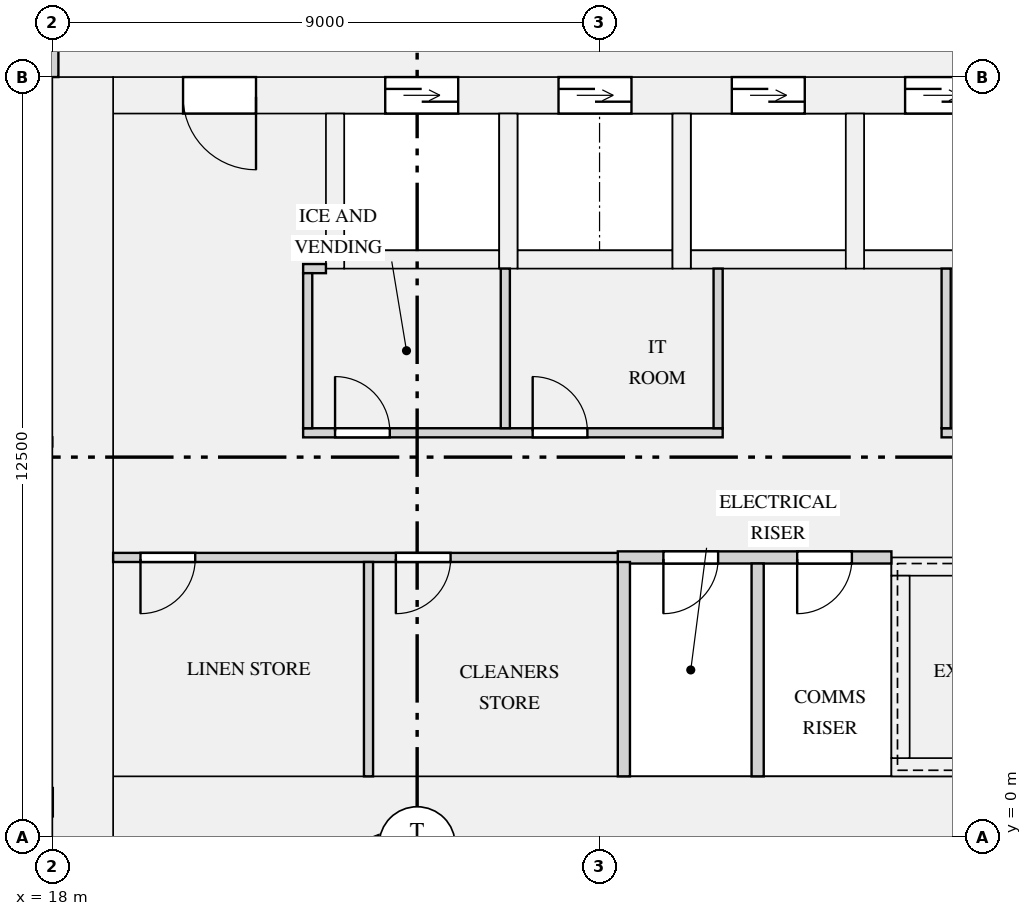
"""IFC4 building model, lengths in metres.
Left out: names, types, materials, properties, quantities, classifications, styles, units other than length and angle.
Written with IfcOpenShell. Run it as: python <this file> out.ifc"""

import sys

from ifc_helpers import new_model, si_unit, direction, frame, frame_2d, origin, place, context, subcontext, project, spatial, rectangle, extrude, element, fill, save


model = new_model("IFC4")
c1 = context("Model", 3, precision=1e-05, world=origin(), true_north=direction((0.0, 1.0)))
c2 = subcontext(c1, "Body", "Model", "MODEL_VIEW")
j1 = project(units=[si_unit("LENGTHUNIT", "METRE"), si_unit("PLANEANGLEUNIT", "RADIAN")], contexts=[c1])
p1 = place(None, origin())
s1 = spatial("IfcSite", under=j1, at=p1, CompositionType="ELEMENT")
p2 = place(p1, origin())
s2 = spatial("IfcBuilding", under=s1, at=p2, CompositionType="ELEMENT")
p3 = place(p2, frame((0.0, 0.0, 19.5)))
s3 = spatial("IfcBuildingStorey", under=s2, at=p3, CompositionType="ELEMENT", Elevation=19.5)
p4 = place(p3, frame((18.5, 0.0, 0.0), z_axis=(0.0, 0.0, 1.0), x_axis=(0.0, 1.0, 0.0)))
e1 = element("IfcWall", 1, at=p4, inside=s3, PredefinedType="SHEAR", context=c2, shape_type="SweptSolid", body=[
    extrude(rectangle(XDim=12.5, YDim=1.0, at=frame_2d((6.25, 0.0))), origin(), (0.0, 0.0, 1.0), 3.15),
])
p5 = place(p3, frame((19.0, 0.5, 0.0), z_axis=(0.0, 0.0, 1.0), x_axis=(1.0, 0.0, 0.0)))
e2 = element("IfcWall", 2, at=p5, inside=s3, PredefinedType="SHEAR", context=c2, shape_type="SweptSolid", body=[
    extrude(rectangle(XDim=34.0, YDim=1.0, at=frame_2d((17.0, 0.0))), origin(), (0.0, 0.0, 1.0), 3.15),
])
p6 = place(p3, frame((19.0, 12.2, 0.0), z_axis=(0.0, 0.0, 1.0), x_axis=(1.0, 0.0, 0.0)))
e3 = element("IfcWall", 3, at=p6, inside=s3, PredefinedType="SHEAR", context=c2, shape_type="SweptSolid", body=[
    extrude(rectangle(XDim=34.0, YDim=0.6, at=frame_2d((17.0, 0.0))), origin(), (0.0, 0.0, 1.0), 3.15),
])
p7 = place(p6, frame((4.475, 0.0, 0.0)))
e4 = element("IfcOpeningElement", 4, at=p7, cuts=e3, PredefinedType="OPENING", context=c2, shape_type="SweptSolid", body=[
    extrude(rectangle(XDim=1.2, YDim=2.1, at=frame_2d((0.6, 1.05))), frame((0.0, 0.31, 0.0), z_axis=(0.0, -1.0, 0.0), x_axis=(1.0, 0.0, 0.0)), (0.0, 0.0, 1.0), 0.62),
])
p8 = place(p6, frame((7.325, 0.0, 0.0)))
e5 = element("IfcOpeningElement", 5, at=p8, cuts=e3, PredefinedType="OPENING", context=c2, shape_type="SweptSolid", body=[
    extrude(rectangle(XDim=1.2, YDim=2.1, at=frame_2d((0.6, 1.05))), frame((0.0, 0.31, 0.0), z_axis=(0.0, -1.0, 0.0), x_axis=(1.0, 0.0, 0.0)), (0.0, 0.0, 1.0), 0.62),
])
p9 = place(p6, frame((10.175, 0.0, 0.0)))
e6 = element("IfcOpeningElement", 6, at=p9, cuts=e3, PredefinedType="OPENING", context=c2, shape_type="SweptSolid", body=[
    extrude(rectangle(XDim=1.2, YDim=2.1, at=frame_2d((0.6, 1.05))), frame((0.0, 0.31, 0.0), z_axis=(0.0, -1.0, 0.0), x_axis=(1.0, 0.0, 0.0)), (0.0, 0.0, 1.0), 0.62),
])
p10 = place(p6, frame((13.025, 0.0, 0.0)))
e7 = element("IfcOpeningElement", 7, at=p10, cuts=e3, PredefinedType="OPENING", context=c2, shape_type="SweptSolid", body=[
    extrude(rectangle(XDim=1.2, YDim=2.1, at=frame_2d((0.6, 1.05))), frame((0.0, 0.31, 0.0), z_axis=(0.0, -1.0, 0.0), x_axis=(1.0, 0.0, 0.0)), (0.0, 0.0, 1.0), 0.62),
])
p11 = place(p6, frame((15.875, 0.0, 0.0)))
e8 = element("IfcOpeningElement", 8, at=p11, cuts=e3, PredefinedType="OPENING", context=c2, shape_type="SweptSolid", body=[
    extrude(rectangle(XDim=1.2, YDim=2.1, at=frame_2d((0.6, 1.05))), frame((0.0, 0.31, 0.0), z_axis=(0.0, -1.0, 0.0), x_axis=(1.0, 0.0, 0.0)), (0.0, 0.0, 1.0), 0.62),
])
p12 = place(p6, frame((24.175, 0.0, 0.0)))
e9 = element("IfcOpeningElement", 9, at=p12, cuts=e3, PredefinedType="OPENING", context=c2, shape_type="SweptSolid", body=[
    extrude(rectangle(XDim=1.1, YDim=2.1, at=frame_2d((0.55, 1.05))), frame((0.0, 0.31, 0.0), z_axis=(0.0, -1.0, 0.0), x_axis=(1.0, 0.0, 0.0)), (0.0, 0.0, 1.0), 0.62),
])
p13 = place(p6, frame((26.425, 0.0, 0.0)))
e10 = element("IfcOpeningElement", 10, at=p13, cuts=e3, PredefinedType="OPENING", context=c2, shape_type="SweptSolid", body=[
    extrude(rectangle(XDim=1.1, YDim=2.1, at=frame_2d((0.55, 1.05))), frame((0.0, 0.31, 0.0), z_axis=(0.0, -1.0, 0.0), x_axis=(1.0, 0.0, 0.0)), (0.0, 0.0, 1.0), 0.62),
])
p14 = place(p6, frame((28.675, 0.0, 0.0)))
e11 = element("IfcOpeningElement", 11, at=p14, cuts=e3, PredefinedType="OPENING", context=c2, shape_type="SweptSolid", body=[
    extrude(rectangle(XDim=1.1, YDim=2.1, at=frame_2d((0.55, 1.05))), frame((0.0, 0.31, 0.0), z_axis=(0.0, -1.0, 0.0), x_axis=(1.0, 0.0, 0.0)), (0.0, 0.0, 1.0), 0.62),
])
p15 = place(p6, frame((1.15, 0.0, 0.0)))
e12 = element("IfcOpeningElement", 12, at=p15, cuts=e3, PredefinedType="OPENING", context=c2, shape_type="SweptSolid", body=[
    extrude(rectangle(XDim=1.2, YDim=2.1, at=frame_2d((0.6, 1.05))), frame((0.0, 0.31, 0.0), z_axis=(0.0, -1.0, 0.0), x_axis=(1.0, 0.0, 0.0)), (0.0, 0.0, 1.0), 0.62),
])
p16 = place(p6, frame((31.65, 0.0, 0.0)))
e13 = element("IfcOpeningElement", 13, at=p16, cuts=e3, PredefinedType="OPENING", context=c2, shape_type="SweptSolid", body=[
    extrude(rectangle(XDim=1.2, YDim=2.1, at=frame_2d((0.6, 1.05))), frame((0.0, 0.31, 0.0), z_axis=(0.0, -1.0, 0.0), x_axis=(1.0, 0.0, 0.0)), (0.0, 0.0, 1.0), 0.62),
])
p17 = place(p3, frame((22.8, 9.5, 0.0), z_axis=(0.0, 0.0, 1.0), x_axis=(1.0, 0.0, 0.0)))
e14 = element("IfcWall", 14, at=p17, inside=s3, PredefinedType="SHEAR", context=c2, shape_type="SweptSolid", body=[
    extrude(rectangle(XDim=2.55, YDim=0.3, at=frame_2d((1.275, 0.0))), origin(), (0.0, 0.0, 1.0), 3.15),
])
p18 = place(p3, frame((22.65, 9.35, 0.0), z_axis=(0.0, 0.0, 1.0), x_axis=(0.0, 1.0, 0.0)))
e15 = element("IfcWall", 15, at=p18, inside=s3, PredefinedType="SHEAR", context=c2, shape_type="SweptSolid", body=[
    extrude(rectangle(XDim=2.55, YDim=0.3, at=frame_2d((1.275, 0.0))), origin(), (0.0, 0.0, 1.0), 3.15),
])
p19 = place(p3, frame((25.65, 9.5, 0.0), z_axis=(0.0, 0.0, 1.0), x_axis=(1.0, 0.0, 0.0)))
e16 = element("IfcWall", 16, at=p19, inside=s3, PredefinedType="SHEAR", context=c2, shape_type="SweptSolid", body=[
    extrude(rectangle(XDim=2.55, YDim=0.3, at=frame_2d((1.275, 0.0))), origin(), (0.0, 0.0, 1.0), 3.15),
])
p20 = place(p3, frame((25.5, 9.35, 0.0), z_axis=(0.0, 0.0, 1.0), x_axis=(0.0, 1.0, 0.0)))
e17 = element("IfcWall", 17, at=p20, inside=s3, PredefinedType="SHEAR", context=c2, shape_type="SweptSolid", body=[
    extrude(rectangle(XDim=2.55, YDim=0.3, at=frame_2d((1.275, 0.0))), origin(), (0.0, 0.0, 1.0), 3.15),
])
p21 = place(p3, frame((28.5, 9.5, 0.0), z_axis=(0.0, 0.0, 1.0), x_axis=(1.0, 0.0, 0.0)))
e18 = element("IfcWall", 18, at=p21, inside=s3, PredefinedType="SHEAR", context=c2, shape_type="SweptSolid", body=[
    extrude(rectangle(XDim=2.55, YDim=0.3, at=frame_2d((1.275, 0.0))), origin(), (0.0, 0.0, 1.0), 3.15),
])
for number, where, z_axis, x_axis in (
    (19, (28.35, 9.35, 0.0), (0.0, 0.0, 1.0), (0.0, 1.0, 0.0)),
    (20, (31.35, 9.5, 0.0), (0.0, 0.0, 1.0), (1.0, 0.0, 0.0)),
    (21, (31.2, 9.35, 0.0), (0.0, 0.0, 1.0), (0.0, 1.0, 0.0)),
):
    element("IfcWall", number, at=place(p3, frame(where, z_axis=z_axis, x_axis=x_axis)), inside=s3, PredefinedType="SHEAR", context=c2, shape_type="SweptSolid", body=[
        extrude(rectangle(XDim=2.55, YDim=0.3, at=frame_2d((1.275, 0.0))), origin(), (0.0, 0.0, 1.0), 3.15),
    ])
p22 = place(p3, frame((31.8, 1.15, 0.0), z_axis=(0.0, 0.0, 1.0), x_axis=(1.0, 0.0, 0.0)))
e22 = element("IfcWall", 22, at=p22, inside=s3, PredefinedType="SHEAR", context=c2, shape_type="SweptSolid", body=[
    extrude(rectangle(XDim=8.4, YDim=0.3, at=frame_2d((4.2, 0.0))), origin(), (0.0, 0.0, 1.0), 3.15),
])
p23 = place(p3, frame((31.8, 4.45, 0.0), z_axis=(0.0, 0.0, 1.0), x_axis=(1.0, 0.0, 0.0)))
e23 = element("IfcWall", 23, at=p23, inside=s3, PredefinedType="SHEAR", context=c2, shape_type="SweptSolid", body=[
    extrude(rectangle(XDim=8.4, YDim=0.3, at=frame_2d((4.2, 0.0))), origin(), (0.0, 0.0, 1.0), 3.15),
])
p24 = place(p23, frame((6.8, 0.0, 0.0)))
e24 = element("IfcOpeningElement", 24, at=p24, cuts=e23, PredefinedType="OPENING", context=c2, shape_type="SweptSolid", body=[
    extrude(rectangle(XDim=1.1, YDim=2.1, at=frame_2d((0.55, 1.05))), frame((0.0, 0.16, 0.0), z_axis=(0.0, -1.0, 0.0), x_axis=(1.0, 0.0, 0.0)), (0.0, 0.0, 1.0), 0.32),
])
p25 = place(p3, frame((31.95, 1.3, 0.0), z_axis=(0.0, 0.0, 1.0), x_axis=(0.0, 1.0, 0.0)))
e25 = element("IfcWall", 25, at=p25, inside=s3, PredefinedType="SHEAR", context=c2, shape_type="SweptSolid", body=[
    extrude(rectangle(XDim=3.0, YDim=0.3, at=frame_2d((1.5, 0.0))), origin(), (0.0, 0.0, 1.0), 3.15),
])
p26 = place(p3, frame((27.3, 4.6, 0.0), z_axis=(0.0, 0.0, 1.0), x_axis=(1.0, 0.0, 0.0)))
e26 = element("IfcWall", 26, at=p26, inside=s3, PredefinedType="PARTITIONING", context=c2, shape_type="SweptSolid", body=[
    extrude(rectangle(XDim=4.5, YDim=0.2, at=frame_2d((2.25, 0.0))), origin(), (0.0, 0.0, 1.0), 2.83),
])
p27 = place(p26, frame((0.75, 0.0, 0.0)))
e27 = element("IfcOpeningElement", 27, at=p27, cuts=e26, PredefinedType="OPENING", context=c2, shape_type="SweptSolid", body=[
    extrude(rectangle(XDim=0.9, YDim=2.1, at=frame_2d((0.45, 1.05))), frame((0.0, 0.11, 0.0), z_axis=(0.0, -1.0, 0.0), x_axis=(1.0, 0.0, 0.0)), (0.0, 0.0, 1.0), 0.22),
])
p28 = place(p26, frame((2.95, 0.0, 0.0)))
e28 = element("IfcOpeningElement", 28, at=p28, cuts=e26, PredefinedType="OPENING", context=c2, shape_type="SweptSolid", body=[
    extrude(rectangle(XDim=0.9, YDim=2.1, at=frame_2d((0.45, 1.05))), frame((0.0, 0.11, 0.0), z_axis=(0.0, -1.0, 0.0), x_axis=(1.0, 0.0, 0.0)), (0.0, 0.0, 1.0), 0.22),
])
p29 = place(p3, frame((19.0, 4.6, 0.0), z_axis=(0.0, 0.0, 1.0), x_axis=(1.0, 0.0, 0.0)))
e29 = element("IfcWall", 29, at=p29, inside=s3, PredefinedType="PARTITIONING", context=c2, shape_type="SweptSolid", body=[
    extrude(rectangle(XDim=8.3, YDim=0.15, at=frame_2d((4.15, 0.0))), origin(), (0.0, 0.0, 1.0), 2.83),
])
p30 = place(p29, frame((0.45, 0.0, 0.0)))
e30 = element("IfcOpeningElement", 30, at=p30, cuts=e29, PredefinedType="OPENING", context=c2, shape_type="SweptSolid", body=[
    extrude(rectangle(XDim=0.9, YDim=2.1, at=frame_2d((0.45, 1.05))), frame((0.0, 0.085, 0.0), z_axis=(0.0, -1.0, 0.0), x_axis=(1.0, 0.0, 0.0)), (0.0, 0.0, 1.0), 0.17),
])
p31 = place(p29, frame((4.65, 0.0, 0.0)))
e31 = element("IfcOpeningElement", 31, at=p31, cuts=e29, PredefinedType="OPENING", context=c2, shape_type="SweptSolid", body=[
    extrude(rectangle(XDim=0.9, YDim=2.1, at=frame_2d((0.45, 1.05))), frame((0.0, 0.085, 0.0), z_axis=(0.0, -1.0, 0.0), x_axis=(1.0, 0.0, 0.0)), (0.0, 0.0, 1.0), 0.17),
])
p32 = place(p3, frame((22.125, 6.65, 0.0), z_axis=(0.0, 0.0, 1.0), x_axis=(1.0, 0.0, 0.0)))
e32 = element("IfcWall", 32, at=p32, inside=s3, PredefinedType="PARTITIONING", context=c2, shape_type="SweptSolid", body=[
    extrude(rectangle(XDim=6.9, YDim=0.15, at=frame_2d((3.45, 0.0))), origin(), (0.0, 0.0, 1.0), 2.83),
])
p33 = place(p32, frame((0.525, 0.0, 0.0)))
e33 = element("IfcOpeningElement", 33, at=p33, cuts=e32, PredefinedType="OPENING", context=c2, shape_type="SweptSolid", body=[
    extrude(rectangle(XDim=0.9, YDim=2.1, at=frame_2d((0.45, 1.05))), frame((0.0, 0.085, 0.0), z_axis=(0.0, -1.0, 0.0), x_axis=(1.0, 0.0, 0.0)), (0.0, 0.0, 1.0), 0.17),
])
p34 = place(p32, frame((3.775, 0.0, 0.0)))
e34 = element("IfcOpeningElement", 34, at=p34, cuts=e32, PredefinedType="OPENING", context=c2, shape_type="SweptSolid", body=[
    extrude(rectangle(XDim=0.9, YDim=2.1, at=frame_2d((0.45, 1.05))), frame((0.0, 0.085, 0.0), z_axis=(0.0, -1.0, 0.0), x_axis=(1.0, 0.0, 0.0)), (0.0, 0.0, 1.0), 0.17),
])
p35 = place(p3, frame((32.625, 6.65, 0.0), z_axis=(0.0, 0.0, 1.0), x_axis=(1.0, 0.0, 0.0)))
e35 = element("IfcWall", 35, at=p35, inside=s3, PredefinedType="PARTITIONING", context=c2, shape_type="SweptSolid", body=[
    extrude(rectangle(XDim=6.15, YDim=0.15, at=frame_2d((3.075, 0.0))), origin(), (0.0, 0.0, 1.0), 2.83),
])
p36 = place(p35, frame((0.525, 0.0, 0.0)))
e36 = element("IfcOpeningElement", 36, at=p36, cuts=e35, PredefinedType="OPENING", context=c2, shape_type="SweptSolid", body=[
    extrude(rectangle(XDim=0.9, YDim=2.1, at=frame_2d((0.45, 1.05))), frame((0.0, 0.085, 0.0), z_axis=(0.0, -1.0, 0.0), x_axis=(1.0, 0.0, 0.0)), (0.0, 0.0, 1.0), 0.17),
])
p37 = place(p3, frame((22.125, 9.35, 0.0), z_axis=(0.0, 0.0, 1.0), x_axis=(1.0, 0.0, 0.0)))
e37 = element("IfcWall", 37, at=p37, inside=s3, PredefinedType="PARTITIONING", context=c2, shape_type="SweptSolid", body=[
    extrude(rectangle(XDim=0.375, YDim=0.15, at=frame_2d((0.188, 0.0))), origin(), (0.0, 0.0, 1.0), 2.83),
])
p38 = place(p3, frame((23.2, 1.0, 0.0), z_axis=(0.0, 0.0, 1.0), x_axis=(0.0, 1.0, 0.0)))
e38 = element("IfcWall", 38, at=p38, inside=s3, PredefinedType="PARTITIONING", context=c2, shape_type="SweptSolid", body=[
    extrude(rectangle(XDim=3.525, YDim=0.15, at=frame_2d((1.762, 0.0))), origin(), (0.0, 0.0, 1.0), 2.83),
])
p39 = place(p3, frame((27.4, 1.0, 0.0), z_axis=(0.0, 0.0, 1.0), x_axis=(0.0, 1.0, 0.0)))
e39 = element("IfcWall", 39, at=p39, inside=s3, PredefinedType="PARTITIONING", context=c2, shape_type="SweptSolid", body=[
    extrude(rectangle(XDim=3.525, YDim=0.2, at=frame_2d((1.762, 0.0))), origin(), (0.0, 0.0, 1.0), 2.83),
])
p40 = place(p3, frame((29.6, 1.0, 0.0), z_axis=(0.0, 0.0, 1.0), x_axis=(0.0, 1.0, 0.0)))
e40 = element("IfcWall", 40, at=p40, inside=s3, PredefinedType="PARTITIONING", context=c2, shape_type="SweptSolid", body=[
    extrude(rectangle(XDim=3.5, YDim=0.2, at=frame_2d((1.75, 0.0))), origin(), (0.0, 0.0, 1.0), 2.83),
])
p41 = place(p3, frame((22.2, 6.725, 0.0), z_axis=(0.0, 0.0, 1.0), x_axis=(0.0, 1.0, 0.0)))
e41 = element("IfcWall", 41, at=p41, inside=s3, PredefinedType="PARTITIONING", context=c2, shape_type="SweptSolid", body=[
    extrude(rectangle(XDim=2.55, YDim=0.15, at=frame_2d((1.275, 0.0))), origin(), (0.0, 0.0, 1.0), 2.83),
])
for number, where, z_axis, x_axis in (
    (42, (25.45, 6.725, 0.0), (0.0, 0.0, 1.0), (0.0, 1.0, 0.0)),
    (43, (28.95, 6.725, 0.0), (0.0, 0.0, 1.0), (0.0, 1.0, 0.0)),
    (44, (32.7, 6.725, 0.0), (0.0, 0.0, 1.0), (0.0, 1.0, 0.0)),
):
    element("IfcWall", number, at=place(p3, frame(where, z_axis=z_axis, x_axis=x_axis)), inside=s3, PredefinedType="PARTITIONING", context=c2, shape_type="SweptSolid", body=[
        extrude(rectangle(XDim=2.625, YDim=0.15, at=frame_2d((1.312, 0.0))), origin(), (0.0, 0.0, 1.0), 2.83),
    ])
p42 = place(p3, frame((18.0, 12.5, 0.0), z_axis=(0.0, 0.0, 1.0), x_axis=(0.0, 1.0, 0.0)))
e45 = element("IfcWall", 45, at=p42, inside=s3, PredefinedType="PARTITIONING", context=c2, shape_type="SweptSolid", body=[
    extrude(rectangle(XDim=3.4, YDim=0.2, at=frame_2d((1.7, 0.0))), origin(), (0.0, 0.0, 1.0), 2.83),
])
p43 = place(p7, origin())
e46 = element("IfcDoor", 46, at=p43, inside=s3, OperationType="DOUBLE_DOOR_SLIDING", PredefinedType="DOOR", context=c2, shape_type="SweptSolid", body=[
    extrude(rectangle(XDim=1.2, YDim=2.1, at=frame_2d((0.6, 1.05))), frame((0.0, 0.025, 0.0), z_axis=(0.0, -1.0, 0.0), x_axis=(1.0, 0.0, 0.0)), (0.0, 0.0, 1.0), 0.05),
])
fill(e4, e46)
p44 = place(p8, origin())
e47 = element("IfcDoor", 47, at=p44, inside=s3, OperationType="DOUBLE_DOOR_SLIDING", PredefinedType="DOOR", context=c2, shape_type="SweptSolid", body=[
    extrude(rectangle(XDim=1.2, YDim=2.1, at=frame_2d((0.6, 1.05))), frame((0.0, 0.025, 0.0), z_axis=(0.0, -1.0, 0.0), x_axis=(1.0, 0.0, 0.0)), (0.0, 0.0, 1.0), 0.05),
])
fill(e5, e47)
p45 = place(p9, origin())
e48 = element("IfcDoor", 48, at=p45, inside=s3, OperationType="DOUBLE_DOOR_SLIDING", PredefinedType="DOOR", context=c2, shape_type="SweptSolid", body=[
    extrude(rectangle(XDim=1.2, YDim=2.1, at=frame_2d((0.6, 1.05))), frame((0.0, 0.025, 0.0), z_axis=(0.0, -1.0, 0.0), x_axis=(1.0, 0.0, 0.0)), (0.0, 0.0, 1.0), 0.05),
])
fill(e6, e48)
p46 = place(p10, origin())
e49 = element("IfcDoor", 49, at=p46, inside=s3, OperationType="DOUBLE_DOOR_SLIDING", PredefinedType="DOOR", context=c2, shape_type="SweptSolid", body=[
    extrude(rectangle(XDim=1.2, YDim=2.1, at=frame_2d((0.6, 1.05))), frame((0.0, 0.025, 0.0), z_axis=(0.0, -1.0, 0.0), x_axis=(1.0, 0.0, 0.0)), (0.0, 0.0, 1.0), 0.05),
])
fill(e7, e49)
p47 = place(p33, origin())
e50 = element("IfcDoor", 50, at=p47, inside=s3, OperationType="SINGLE_SWING_LEFT", PredefinedType="DOOR", context=c2, shape_type="SweptSolid", body=[
    extrude(rectangle(XDim=0.9, YDim=2.1, at=frame_2d((0.45, 1.05))), frame((0.0, 0.025, 0.0), z_axis=(0.0, -1.0, 0.0), x_axis=(1.0, 0.0, 0.0)), (0.0, 0.0, 1.0), 0.05),
])
fill(e33, e50)
p48 = place(p34, origin())
e51 = element("IfcDoor", 51, at=p48, inside=s3, OperationType="SINGLE_SWING_LEFT", PredefinedType="DOOR", context=c2, shape_type="SweptSolid", body=[
    extrude(rectangle(XDim=0.9, YDim=2.1, at=frame_2d((0.45, 1.05))), frame((0.0, 0.025, 0.0), z_axis=(0.0, -1.0, 0.0), x_axis=(1.0, 0.0, 0.0)), (0.0, 0.0, 1.0), 0.05),
])
fill(e34, e51)
p49 = place(p30, frame((0.9, 0.0, 0.0), z_axis=(0.0, 0.0, 1.0), x_axis=(-1.0, 0.0, 0.0)))
e52 = element("IfcDoor", 52, at=p49, inside=s3, OperationType="SINGLE_SWING_RIGHT", PredefinedType="DOOR", context=c2, shape_type="SweptSolid", body=[
    extrude(rectangle(XDim=0.9, YDim=2.1, at=frame_2d((0.45, 1.05))), frame((0.0, 0.025, 0.0), z_axis=(0.0, -1.0, 0.0), x_axis=(1.0, 0.0, 0.0)), (0.0, 0.0, 1.0), 0.05),
])
fill(e30, e52)
p50 = place(p31, frame((0.9, 0.0, 0.0), z_axis=(0.0, 0.0, 1.0), x_axis=(-1.0, 0.0, 0.0)))
e53 = element("IfcDoor", 53, at=p50, inside=s3, OperationType="SINGLE_SWING_RIGHT", PredefinedType="DOOR", context=c2, shape_type="SweptSolid", body=[
    extrude(rectangle(XDim=0.9, YDim=2.1, at=frame_2d((0.45, 1.05))), frame((0.0, 0.025, 0.0), z_axis=(0.0, -1.0, 0.0), x_axis=(1.0, 0.0, 0.0)), (0.0, 0.0, 1.0), 0.05),
])
fill(e31, e53)
p51 = place(p27, frame((0.9, 0.0, 0.0), z_axis=(0.0, 0.0, 1.0), x_axis=(-1.0, 0.0, 0.0)))
e54 = element("IfcDoor", 54, at=p51, inside=s3, OperationType="SINGLE_SWING_RIGHT", PredefinedType="DOOR", context=c2, shape_type="SweptSolid", body=[
    extrude(rectangle(XDim=0.9, YDim=2.1, at=frame_2d((0.45, 1.05))), frame((0.0, 0.025, 0.0), z_axis=(0.0, -1.0, 0.0), x_axis=(1.0, 0.0, 0.0)), (0.0, 0.0, 1.0), 0.05),
])
fill(e27, e54)
p52 = place(p28, frame((0.9, 0.0, 0.0), z_axis=(0.0, 0.0, 1.0), x_axis=(-1.0, 0.0, 0.0)))
e55 = element("IfcDoor", 55, at=p52, inside=s3, OperationType="SINGLE_SWING_RIGHT", PredefinedType="DOOR", context=c2, shape_type="SweptSolid", body=[
    extrude(rectangle(XDim=0.9, YDim=2.1, at=frame_2d((0.45, 1.05))), frame((0.0, 0.025, 0.0), z_axis=(0.0, -1.0, 0.0), x_axis=(1.0, 0.0, 0.0)), (0.0, 0.0, 1.0), 0.05),
])
fill(e28, e55)
p53 = place(p15, frame((1.2, 0.0, 0.0), z_axis=(0.0, 0.0, 1.0), x_axis=(-1.0, 0.0, 0.0)))
e56 = element("IfcDoor", 56, at=p53, inside=s3, OperationType="SINGLE_SWING_LEFT", PredefinedType="DOOR", context=c2, shape_type="SweptSolid", body=[
    extrude(rectangle(XDim=1.2, YDim=2.1, at=frame_2d((0.6, 1.05))), frame((0.0, 0.025, 0.0), z_axis=(0.0, -1.0, 0.0), x_axis=(1.0, 0.0, 0.0)), (0.0, 0.0, 1.0), 0.05),
])
fill(e12, e56)
save(model, sys.argv[1])
